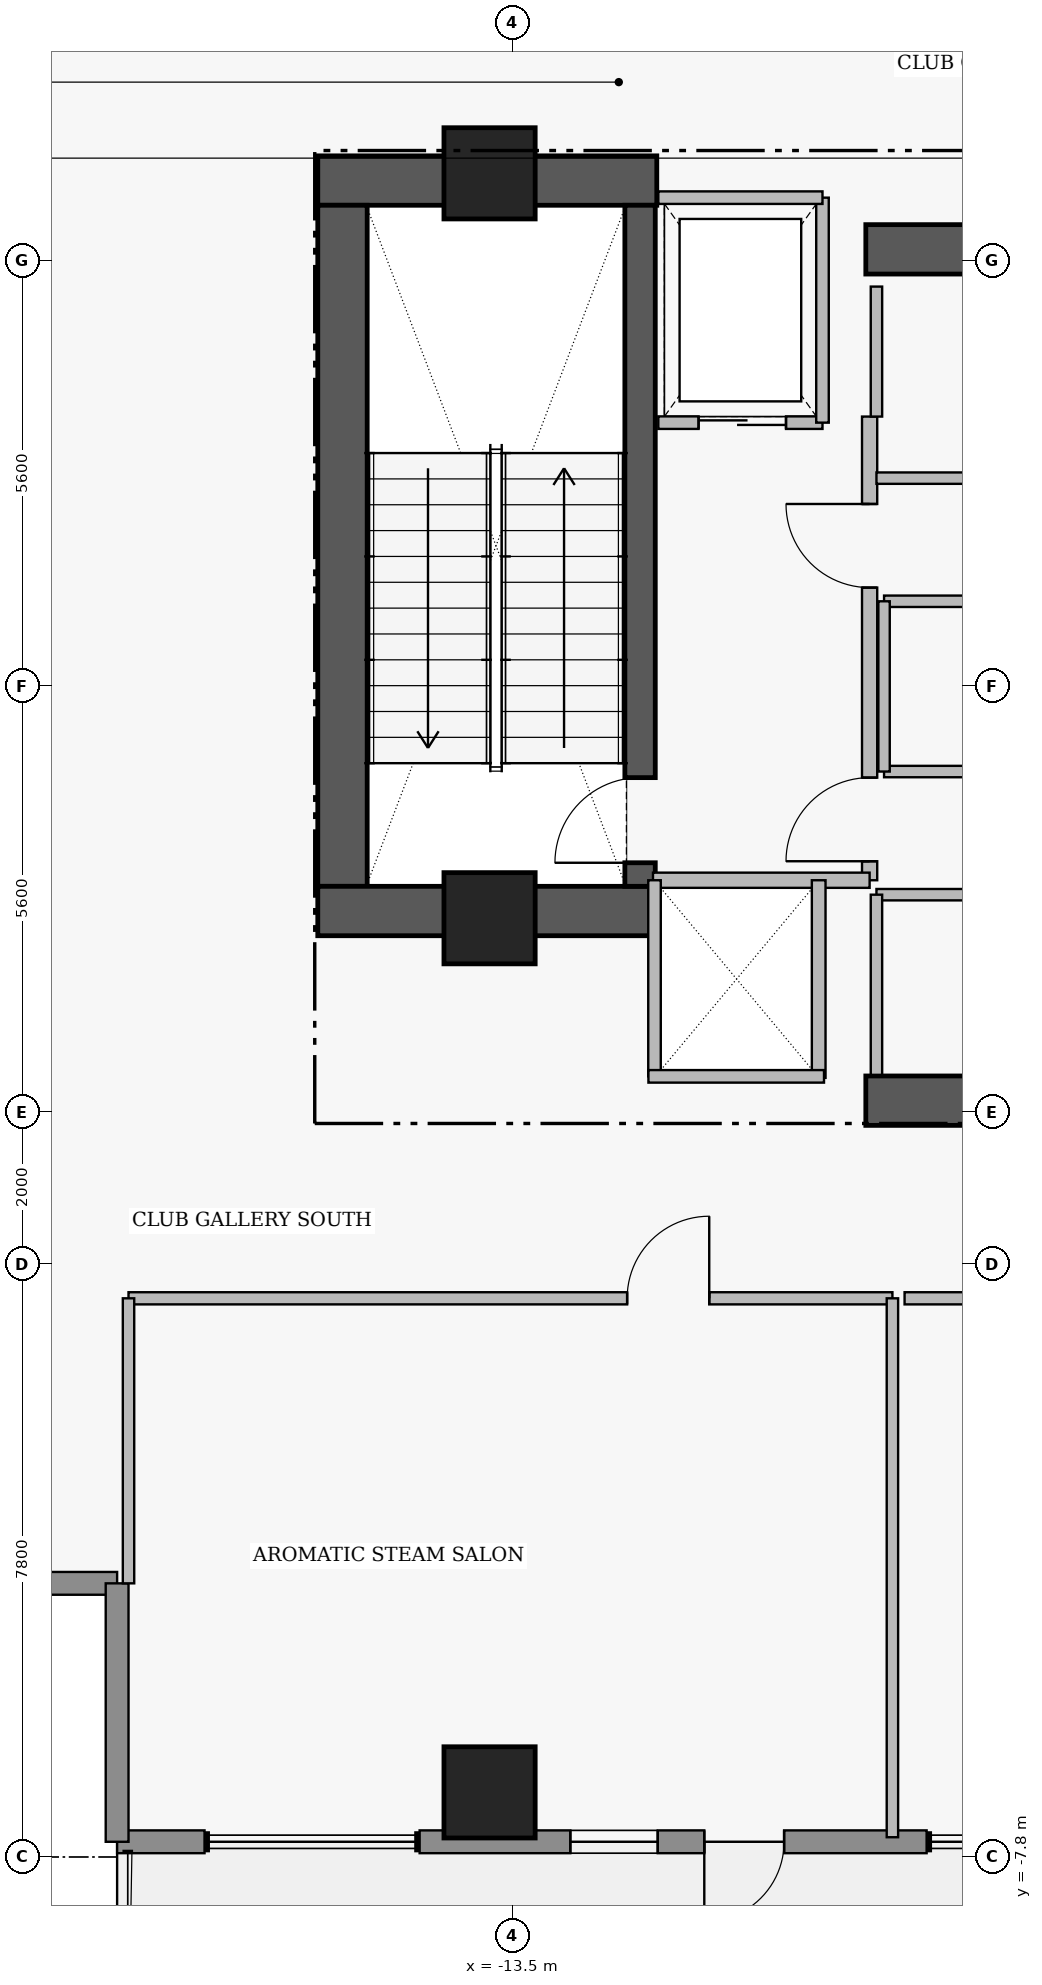
"""IFC4 building model, lengths in metres.
Left out: names, types, materials, properties, quantities, classifications, styles, units other than length and angle.
Written with IfcOpenShell. Run it as: python <this file> out.ifc"""

import sys

from ifc_helpers import new_model, si_unit, direction, frame, frame_2d, origin, origin_2d, place, context, subcontext, project, spatial, rectangle, extrude, element, fill, save


model = new_model("IFC4")
c1 = context("Model", 3, precision=1e-05, world=origin(), true_north=direction((0.0, 1.0)))
c2 = subcontext(c1, "Body", "Model", "MODEL_VIEW")
j1 = project(units=[si_unit("LENGTHUNIT", "METRE"), si_unit("PLANEANGLEUNIT", "RADIAN")], contexts=[c1])
p1 = place(None, origin())
s1 = spatial("IfcSite", under=j1, at=p1, CompositionType="ELEMENT")
p2 = place(p1, origin())
s2 = spatial("IfcBuilding", under=s1, at=p2, CompositionType="ELEMENT")
p3 = place(p2, frame((0.0, 0.0, 172.8)))
s3 = spatial("IfcBuildingStorey", under=s2, at=p3, CompositionType="ELEMENT", Elevation=172.8)
p4 = place(p3, frame((-16.06, 14.255, 0.0), z_axis=(0.0, 0.0, 1.0), x_axis=(1.0, 0.0, 0.0)))
e1 = element("IfcWall", 1, at=p4, inside=s3, PredefinedType="SHEAR", context=c2, shape_type="SweptSolid", body=[
    extrude(rectangle(XDim=4.46, YDim=0.65, at=frame_2d((2.23, 0.0))), origin(), (0.0, 0.0, 1.0), 4.41),
])
p5 = place(p3, frame((-15.735, 4.97, 0.0), z_axis=(0.0, 0.0, 1.0), x_axis=(0.0, 1.0, 0.0)))
e2 = element("IfcWall", 2, at=p5, inside=s3, PredefinedType="SHEAR", context=c2, shape_type="SweptSolid", body=[
    extrude(rectangle(XDim=8.96, YDim=0.65, at=frame_2d((4.48, 0.0))), origin(), (0.0, 0.0, 1.0), 4.41),
])
p6 = place(p3, frame((-16.06, 4.645, 0.0), z_axis=(0.0, 0.0, 1.0), x_axis=(1.0, 0.0, 0.0)))
e3 = element("IfcWall", 3, at=p6, inside=s3, PredefinedType="SHEAR", context=c2, shape_type="SweptSolid", body=[
    extrude(rectangle(XDim=4.46, YDim=0.65, at=frame_2d((2.23, 0.0))), origin(), (0.0, 0.0, 1.0), 4.41),
])
for number, where, z_axis, x_axis in (
    (4, (-8.85, 2.15, 0.0), (0.0, 0.0, 1.0), (1.0, 0.0, 0.0)),
    (5, (-8.85, 13.35, 0.0), (0.0, 0.0, 1.0), (1.0, 0.0, 0.0)),
):
    element("IfcWall", number, at=place(p3, frame(where, z_axis=z_axis, x_axis=x_axis)), inside=s3, PredefinedType="SHEAR", context=c2, shape_type="SweptSolid", body=[
        extrude(rectangle(XDim=7.6, YDim=0.65, at=frame_2d((3.8, 0.0))), origin(), (0.0, 0.0, 1.0), 4.38),
    ])
p7 = place(p3, frame((-11.82, 4.97, 0.0), z_axis=(0.0, 0.0, 1.0), x_axis=(0.0, 1.0, 0.0)))
e6 = element("IfcWall", 6, at=p7, inside=s3, PredefinedType="SHEAR", context=c2, shape_type="SweptSolid", body=[
    extrude(rectangle(XDim=8.96, YDim=0.4, at=frame_2d((4.48, 0.0))), origin(), (0.0, 0.0, 1.0), 4.41),
])
p8 = place(p7, frame((0.31, 0.0, 0.0)))
e7 = element("IfcOpeningElement", 7, at=p8, cuts=e6, PredefinedType="OPENING", context=c2, shape_type="SweptSolid", body=[
    extrude(rectangle(XDim=1.12, YDim=2.22, at=frame_2d((0.56, 1.11))), frame((0.0, 0.21, 0.0), z_axis=(0.0, -1.0, 0.0), x_axis=(1.0, 0.0, 0.0)), (0.0, 0.0, 1.0), 0.42),
])
for number, where, z_axis, x_axis in (
    (8, (-13.8, 14.35, 0.0), (0.0, 0.0, 1.0), (1.0, 0.0, 0.0)),
    (9, (-13.8, 4.55, 0.0), (0.0, 0.0, 1.0), (1.0, 0.0, 0.0)),
    (10, (-13.8, -6.95, 0.0), (0.0, 0.0, 1.0), (1.0, 0.0, 0.0)),
):
    element("IfcColumn", number, at=place(p3, frame(where, z_axis=z_axis, x_axis=x_axis)), inside=s3, PredefinedType="COLUMN", context=c2, shape_type="SweptSolid", body=[
        extrude(rectangle(XDim=1.2, YDim=1.2, at=origin_2d()), origin(), (0.0, 0.0, 1.0), 4.6),
    ])
p9 = place(p3, frame((-18.7, -4.2, 0.0), z_axis=(0.0, 0.0, 1.0), x_axis=(-1.0, 0.0, 0.0)))
e11 = element("IfcWall", 11, at=p9, inside=s3, PredefinedType="STANDARD", context=c2, shape_type="SweptSolid", body=[
    extrude(rectangle(XDim=3.4, YDim=0.3, at=frame_2d((1.7, 0.0))), origin(), (0.0, 0.0, 1.0), 4.38),
])
p10 = place(p3, frame((-8.05, -7.6, 0.0), z_axis=(0.0, 0.0, 1.0), x_axis=(-1.0, 0.0, 0.0)))
e12 = element("IfcWall", 12, at=p10, inside=s3, PredefinedType="STANDARD", context=c2, shape_type="SweptSolid", body=[
    extrude(rectangle(XDim=6.67, YDim=0.3, at=frame_2d((3.335, 0.0))), origin(), (0.0, 0.0, 1.0), 4.38),
])
p11 = place(p10, frame((1.875, 0.0, 0.0)))
e13 = element("IfcOpeningElement", 13, at=p11, cuts=e12, PredefinedType="OPENING", context=c2, shape_type="SweptSolid", body=[
    extrude(rectangle(XDim=1.05, YDim=2.2, at=frame_2d((0.525, 1.1))), frame((0.0, 0.16, 0.0), z_axis=(0.0, -1.0, 0.0), x_axis=(1.0, 0.0, 0.0)), (0.0, 0.0, 1.0), 0.32),
])
p12 = place(p10, frame((3.538, 0.0, 0.95)))
e14 = element("IfcOpeningElement", 14, at=p12, cuts=e12, PredefinedType="OPENING", context=c2, shape_type="SweptSolid", body=[
    extrude(rectangle(XDim=1.15, YDim=1.55, at=frame_2d((0.575, 0.775))), frame((0.0, 0.16, 0.0), z_axis=(0.0, -1.0, 0.0), x_axis=(1.0, 0.0, 0.0)), (0.0, 0.0, 1.0), 0.32),
])
p13 = place(p3, frame((-17.55, -7.6, 0.0), z_axis=(0.0, 0.0, 1.0), x_axis=(-1.0, 0.0, 0.0)))
e15 = element("IfcWall", 15, at=p13, inside=s3, PredefinedType="STANDARD", context=c2, shape_type="SweptSolid", body=[
    extrude(rectangle(XDim=1.15, YDim=0.3, at=frame_2d((0.575, 0.0))), origin(), (0.0, 0.0, 1.0), 4.38),
])
p14 = place(p3, frame((-18.7, -7.6, 0.0), z_axis=(0.0, 0.0, 1.0), x_axis=(0.0, 1.0, 0.0)))
e16 = element("IfcWall", 16, at=p14, inside=s3, PredefinedType="STANDARD", context=c2, shape_type="SweptSolid", body=[
    extrude(rectangle(XDim=3.4, YDim=0.3, at=frame_2d((1.7, 0.0))), origin(), (0.0, 0.0, 1.0), 4.38),
])
p15 = place(p3, frame((-8.8, 5.05, 0.0), z_axis=(0.0, 0.0, 1.0), x_axis=(0.0, 1.0, 0.0)))
e17 = element("IfcWall", 17, at=p15, inside=s3, PredefinedType="PARTITIONING", context=c2, shape_type="SweptSolid", body=[
    extrude(rectangle(XDim=6.1, YDim=0.2, at=frame_2d((3.05, 0.0))), origin(), (0.0, 0.0, 1.0), 4.38),
])
p16 = place(p15, frame((0.25, 0.0, 0.0)))
e18 = element("IfcOpeningElement", 18, at=p16, cuts=e17, PredefinedType="OPENING", context=c2, shape_type="SweptSolid", body=[
    extrude(rectangle(XDim=1.1, YDim=2.2, at=frame_2d((0.55, 1.1))), frame((0.0, 0.11, 0.0), z_axis=(0.0, -1.0, 0.0), x_axis=(1.0, 0.0, 0.0)), (0.0, 0.0, 1.0), 0.22),
])
p17 = place(p15, frame((3.85, 0.0, 0.0)))
e19 = element("IfcOpeningElement", 19, at=p17, cuts=e17, PredefinedType="OPENING", context=c2, shape_type="SweptSolid", body=[
    extrude(rectangle(XDim=1.1, YDim=2.2, at=frame_2d((0.55, 1.1))), frame((0.0, 0.11, 0.0), z_axis=(0.0, -1.0, 0.0), x_axis=(1.0, 0.0, 0.0)), (0.0, 0.0, 1.0), 0.22),
])
p18 = place(p3, frame((-11.58, 11.07, 0.0), z_axis=(0.0, 0.0, 1.0), x_axis=(1.0, 0.0, 0.0)))
e20 = element("IfcWall", 20, at=p18, inside=s3, PredefinedType="PARTITIONING", context=c2, shape_type="SweptSolid", body=[
    extrude(rectangle(XDim=2.16, YDim=0.165, at=frame_2d((1.08, 0.0))), origin(), (0.0, 0.0, 1.0), 4.38),
])
p19 = place(p18, frame((0.53, 0.0, 0.0)))
e21 = element("IfcOpeningElement", 21, at=p19, cuts=e20, PredefinedType="OPENING", context=c2, shape_type="SweptSolid", body=[
    extrude(rectangle(XDim=1.15, YDim=2.25, at=frame_2d((0.575, 1.125))), frame((0.0, 0.093, 0.0), z_axis=(0.0, -1.0, 0.0), x_axis=(1.0, 0.0, 0.0)), (0.0, 0.0, 1.0), 0.185),
])
p20 = place(p3, frame((-8.71, 4.86, 0.0), z_axis=(0.0, 0.0, 1.0), x_axis=(1.0, 0.0, 0.0)))
e22 = element("IfcWall", 22, at=p20, inside=s3, PredefinedType="PARTITIONING", context=c2, shape_type="SweptSolid", body=[
    extrude(rectangle(XDim=4.52, YDim=0.15, at=frame_2d((2.26, 0.0))), origin(), (0.0, 0.0, 1.0), 4.38),
])
p21 = place(p20, frame((1.81, 0.0, 0.0)))
e23 = element("IfcOpeningElement", 23, at=p21, cuts=e22, PredefinedType="OPENING", context=c2, shape_type="SweptSolid", body=[
    extrude(rectangle(XDim=0.9, YDim=2.15, at=frame_2d((0.45, 1.075))), frame((0.0, 0.085, 0.0), z_axis=(0.0, -1.0, 0.0), x_axis=(1.0, 0.0, 0.0)), (0.0, 0.0, 1.0), 0.17),
])
p22 = place(p3, frame((-8.71, 10.34, 0.0), z_axis=(0.0, 0.0, 1.0), x_axis=(1.0, 0.0, 0.0)))
e24 = element("IfcWall", 24, at=p22, inside=s3, PredefinedType="PARTITIONING", context=c2, shape_type="SweptSolid", body=[
    extrude(rectangle(XDim=4.92, YDim=0.15, at=frame_2d((2.46, 0.0))), origin(), (0.0, 0.0, 1.0), 4.38),
])
p23 = place(p22, frame((2.01, 0.0, 0.0)))
e25 = element("IfcOpeningElement", 25, at=p23, cuts=e24, PredefinedType="OPENING", context=c2, shape_type="SweptSolid", body=[
    extrude(rectangle(XDim=0.9, YDim=2.15, at=frame_2d((0.45, 1.075))), frame((0.0, 0.085, 0.0), z_axis=(0.0, -1.0, 0.0), x_axis=(1.0, 0.0, 0.0)), (0.0, 0.0, 1.0), 0.17),
])
p24 = place(p3, frame((-8.61, 6.48, 0.0), z_axis=(0.0, 0.0, 1.0), x_axis=(1.0, 0.0, 0.0)))
e26 = element("IfcWall", 26, at=p24, inside=s3, PredefinedType="PARTITIONING", context=c2, shape_type="SweptSolid", body=[
    extrude(rectangle(XDim=3.62, YDim=0.15, at=frame_2d((1.81, 0.0))), origin(), (0.0, 0.0, 1.0), 4.38),
])
p25 = place(p24, frame((1.36, 0.0, 0.0)))
e27 = element("IfcOpeningElement", 27, at=p25, cuts=e26, PredefinedType="OPENING", context=c2, shape_type="SweptSolid", body=[
    extrude(rectangle(XDim=0.9, YDim=2.15, at=frame_2d((0.45, 1.075))), frame((0.0, 0.085, 0.0), z_axis=(0.0, -1.0, 0.0), x_axis=(1.0, 0.0, 0.0)), (0.0, 0.0, 1.0), 0.17),
])
p26 = place(p3, frame((-18.55, -0.45, 0.0), z_axis=(0.0, 0.0, 1.0), x_axis=(1.0, 0.0, 0.0)))
e28 = element("IfcWall", 28, at=p26, inside=s3, PredefinedType="PARTITIONING", context=c2, shape_type="SweptSolid", body=[
    extrude(rectangle(XDim=10.05, YDim=0.16, at=frame_2d((5.025, 0.0))), origin(), (0.0, 0.0, 1.0), 4.38),
])
p27 = place(p26, frame((6.56, 0.0, 0.0)))
e29 = element("IfcOpeningElement", 29, at=p27, cuts=e28, PredefinedType="OPENING", context=c2, shape_type="SweptSolid", body=[
    extrude(rectangle(XDim=1.08, YDim=2.18, at=frame_2d((0.54, 1.09))), frame((0.0, 0.09, 0.0), z_axis=(0.0, -1.0, 0.0), x_axis=(1.0, 0.0, 0.0)), (0.0, 0.0, 1.0), 0.18),
])
p28 = place(p3, frame((-8.34, -0.45, 0.0), z_axis=(0.0, 0.0, 1.0), x_axis=(1.0, 0.0, 0.0)))
e30 = element("IfcWall", 30, at=p28, inside=s3, PredefinedType="PARTITIONING", context=c2, shape_type="SweptSolid", body=[
    extrude(rectangle(XDim=7.94, YDim=0.16, at=frame_2d((3.97, 0.0))), origin(), (0.0, 0.0, 1.0), 4.38),
])
p29 = place(p28, frame((5.55, 0.0, 0.0)))
e31 = element("IfcOpeningElement", 31, at=p29, cuts=e30, PredefinedType="OPENING", context=c2, shape_type="SweptSolid", body=[
    extrude(rectangle(XDim=1.08, YDim=2.18, at=frame_2d((0.54, 1.09))), frame((0.0, 0.09, 0.0), z_axis=(0.0, -1.0, 0.0), x_axis=(1.0, 0.0, 0.0)), (0.0, 0.0, 1.0), 0.18),
])
p30 = place(p3, frame((-11.65, 5.05, 0.0), z_axis=(0.0, 0.0, 1.0), x_axis=(1.0, 0.0, 0.0)))
e32 = element("IfcWall", 32, at=p30, inside=s3, PredefinedType="PARTITIONING", context=c2, shape_type="SweptSolid", body=[
    extrude(rectangle(XDim=2.85, YDim=0.2, at=frame_2d((1.425, 0.0))), origin(), (0.0, 0.0, 1.0), 4.38),
])
p31 = place(p3, frame((-9.42, 11.07, 0.0), z_axis=(0.0, 0.0, 1.0), x_axis=(0.0, 1.0, 0.0)))
e33 = element("IfcWall", 33, at=p31, inside=s3, PredefinedType="PARTITIONING", context=c2, shape_type="SweptSolid", body=[
    extrude(rectangle(XDim=2.96, YDim=0.165, at=frame_2d((1.48, 0.0))), origin(), (0.0, 0.0, 1.0), 4.38),
])
p32 = place(p3, frame((-11.58, 14.03, 0.0), z_axis=(0.0, 0.0, 1.0), x_axis=(1.0, 0.0, 0.0)))
e34 = element("IfcWall", 34, at=p32, inside=s3, PredefinedType="PARTITIONING", context=c2, shape_type="SweptSolid", body=[
    extrude(rectangle(XDim=2.16, YDim=0.165, at=frame_2d((1.08, 0.0))), origin(), (0.0, 0.0, 1.0), 4.38),
])
p33 = place(p3, frame((-8.71, 2.49, 0.0), z_axis=(0.0, 0.0, 1.0), x_axis=(0.0, 1.0, 0.0)))
e35 = element("IfcWall", 35, at=p33, inside=s3, PredefinedType="PARTITIONING", context=c2, shape_type="SweptSolid", body=[
    extrude(rectangle(XDim=2.37, YDim=0.15, at=frame_2d((1.185, 0.0))), origin(), (0.0, 0.0, 1.0), 4.38),
])
p34 = place(p3, frame((-8.71, 11.15, 0.0), z_axis=(0.0, 0.0, 1.0), x_axis=(0.0, 1.0, 0.0)))
e36 = element("IfcWall", 36, at=p34, inside=s3, PredefinedType="PARTITIONING", context=c2, shape_type="SweptSolid", body=[
    extrude(rectangle(XDim=1.71, YDim=0.15, at=frame_2d((0.855, 0.0))), origin(), (0.0, 0.0, 1.0), 4.38),
])
p35 = place(p3, frame((-9.47, 2.45, 0.0), z_axis=(0.0, 0.0, 1.0), x_axis=(0.0, 1.0, 0.0)))
e37 = element("IfcWall", 37, at=p35, inside=s3, PredefinedType="PARTITIONING", context=c2, shape_type="SweptSolid", body=[
    extrude(rectangle(XDim=2.6, YDim=0.18, at=frame_2d((1.3, 0.0))), origin(), (0.0, 0.0, 1.0), 4.38),
])
p36 = place(p3, frame((-11.63, 2.47, 0.0), z_axis=(0.0, 0.0, 1.0), x_axis=(0.0, 1.0, 0.0)))
e38 = element("IfcWall", 38, at=p36, inside=s3, PredefinedType="PARTITIONING", context=c2, shape_type="SweptSolid", body=[
    extrude(rectangle(XDim=2.58, YDim=0.165, at=frame_2d((1.29, 0.0))), origin(), (0.0, 0.0, 1.0), 4.38),
])
p37 = place(p3, frame((-11.71, 2.47, 0.0), z_axis=(0.0, 0.0, 1.0), x_axis=(1.0, 0.0, 0.0)))
e39 = element("IfcWall", 39, at=p37, inside=s3, PredefinedType="PARTITIONING", context=c2, shape_type="SweptSolid", body=[
    extrude(rectangle(XDim=2.31, YDim=0.165, at=frame_2d((1.155, 0.0))), origin(), (0.0, 0.0, 1.0), 3.28),
])
p38 = place(p3, frame((-8.61, 8.72, 0.0), z_axis=(0.0, 0.0, 1.0), x_axis=(1.0, 0.0, 0.0)))
e40 = element("IfcWall", 40, at=p38, inside=s3, PredefinedType="PARTITIONING", context=c2, shape_type="SweptSolid", body=[
    extrude(rectangle(XDim=3.62, YDim=0.15, at=frame_2d((1.81, 0.0))), origin(), (0.0, 0.0, 1.0), 4.38),
])
p39 = place(p3, frame((-8.61, 6.48, 0.0), z_axis=(0.0, 0.0, 1.0), x_axis=(0.0, 1.0, 0.0)))
e41 = element("IfcWall", 41, at=p39, inside=s3, PredefinedType="PARTITIONING", context=c2, shape_type="SweptSolid", body=[
    extrude(rectangle(XDim=2.24, YDim=0.15, at=frame_2d((1.12, 0.0))), origin(), (0.0, 0.0, 1.0), 4.38),
])
p40 = place(p3, frame((-18.55, -4.2, 0.0), z_axis=(0.0, 0.0, 1.0), x_axis=(0.0, 1.0, 0.0)))
e42 = element("IfcWall", 42, at=p40, inside=s3, PredefinedType="PARTITIONING", context=c2, shape_type="SweptSolid", body=[
    extrude(rectangle(XDim=3.75, YDim=0.15, at=frame_2d((1.875, 0.0))), origin(), (0.0, 0.0, 1.0), 4.38),
])
p41 = place(p3, frame((-8.5, -7.54, 0.0), z_axis=(0.0, 0.0, 1.0), x_axis=(0.0, 1.0, 0.0)))
e43 = element("IfcWall", 43, at=p41, inside=s3, PredefinedType="PARTITIONING", context=c2, shape_type="SweptSolid", body=[
    extrude(rectangle(XDim=7.09, YDim=0.15, at=frame_2d((3.545, 0.0))), origin(), (0.0, 0.0, 1.0), 4.38),
])
p42 = place(p11, origin())
e44 = element("IfcDoor", 44, at=p42, inside=s3, OperationType="SINGLE_SWING_RIGHT", PredefinedType="DOOR", context=c2, shape_type="SweptSolid", body=[
    extrude(rectangle(XDim=1.05, YDim=2.2, at=frame_2d((0.525, 1.1))), frame((0.0, 0.025, 0.0), z_axis=(0.0, -1.0, 0.0), x_axis=(1.0, 0.0, 0.0)), (0.0, 0.0, 1.0), 0.05),
])
fill(e13, e44)
p43 = place(p12, origin())
e45 = element("IfcWindow", 45, at=p43, inside=s3, PartitioningType="SINGLE_PANEL", PredefinedType="WINDOW", context=c2, shape_type="SweptSolid", body=[
    extrude(rectangle(XDim=1.15, YDim=1.55, at=frame_2d((0.575, 0.775))), frame((0.0, 0.03, 0.0), z_axis=(0.0, -1.0, 0.0), x_axis=(1.0, 0.0, 0.0)), (0.0, 0.0, 1.0), 0.06),
])
fill(e14, e45)
p44 = place(p8, origin())
e46 = element("IfcDoor", 46, at=p44, inside=s3, OperationType="SINGLE_SWING_LEFT", PredefinedType="DOOR", context=c2, shape_type="SweptSolid", body=[
    extrude(rectangle(XDim=1.12, YDim=2.22, at=frame_2d((0.56, 1.11))), frame((0.0, 0.025, 0.0), z_axis=(0.0, -1.0, 0.0), x_axis=(1.0, 0.0, 0.0)), (0.0, 0.0, 1.0), 0.05),
])
fill(e7, e46)
p45 = place(p16, origin())
e47 = element("IfcDoor", 47, at=p45, inside=s3, OperationType="SINGLE_SWING_LEFT", PredefinedType="DOOR", context=c2, shape_type="SweptSolid", body=[
    extrude(rectangle(XDim=1.1, YDim=2.2, at=frame_2d((0.55, 1.1))), frame((0.0, 0.025, 0.0), z_axis=(0.0, -1.0, 0.0), x_axis=(1.0, 0.0, 0.0)), (0.0, 0.0, 1.0), 0.05),
])
fill(e18, e47)
p46 = place(p17, origin())
e48 = element("IfcDoor", 48, at=p46, inside=s3, OperationType="SINGLE_SWING_RIGHT", PredefinedType="DOOR", context=c2, shape_type="SweptSolid", body=[
    extrude(rectangle(XDim=1.1, YDim=2.2, at=frame_2d((0.55, 1.1))), frame((0.0, 0.025, 0.0), z_axis=(0.0, -1.0, 0.0), x_axis=(1.0, 0.0, 0.0)), (0.0, 0.0, 1.0), 0.05),
])
fill(e19, e48)
p47 = place(p19, origin())
e49 = element("IfcDoor", 49, at=p47, inside=s3, OperationType="SLIDING_TO_LEFT", PredefinedType="DOOR", context=c2, shape_type="SweptSolid", body=[
    extrude(rectangle(XDim=1.15, YDim=2.25, at=frame_2d((0.575, 1.125))), frame((0.0, 0.025, 0.0), z_axis=(0.0, -1.0, 0.0), x_axis=(1.0, 0.0, 0.0)), (0.0, 0.0, 1.0), 0.05),
])
fill(e21, e49)
p48 = place(p27, origin())
e50 = element("IfcDoor", 50, at=p48, inside=s3, OperationType="SINGLE_SWING_RIGHT", PredefinedType="DOOR", context=c2, shape_type="SweptSolid", body=[
    extrude(rectangle(XDim=1.08, YDim=2.18, at=frame_2d((0.54, 1.09))), frame((0.0, 0.025, 0.0), z_axis=(0.0, -1.0, 0.0), x_axis=(1.0, 0.0, 0.0)), (0.0, 0.0, 1.0), 0.05),
])
fill(e29, e50)
save(model, sys.argv[1])
